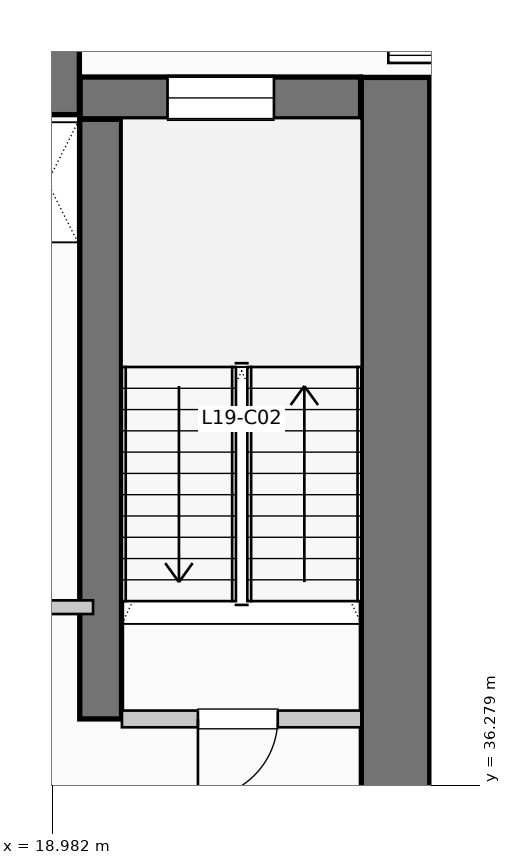
"""IFC4 building model, lengths in metres.
Left out: names, types, materials, properties, quantities, classifications, styles, units other than length and angle.
Written with IfcOpenShell. Run it as: python <this file> out.ifc"""

import sys

from ifc_helpers import new_model, si_unit, direction, frame, frame_2d, origin, place, context, subcontext, project, spatial, rectangle, extrude, element, fill, save


model = new_model("IFC4")
c1 = context("Model", 3, precision=1e-05, world=origin(), true_north=direction((0.0, 1.0)))
c2 = subcontext(c1, "Body", "Model", "MODEL_VIEW")
j1 = project(units=[si_unit("LENGTHUNIT", "METRE"), si_unit("PLANEANGLEUNIT", "RADIAN")], contexts=[c1])
p1 = place(None, origin())
s1 = spatial("IfcSite", under=j1, at=p1, CompositionType="ELEMENT")
p2 = place(p1, origin())
s2 = spatial("IfcBuilding", under=s1, at=p2, CompositionType="ELEMENT")
p3 = place(p2, frame((0.0, 0.0, 81.84)))
s3 = spatial("IfcBuildingStorey", under=s2, at=p3, CompositionType="ELEMENT", Elevation=81.84)
p4 = place(p3, frame((5.36, 45.55, 0.0), z_axis=(0.0, 0.0, 1.0), x_axis=(1.0, 0.0, 0.0)))
e1 = element("IfcWall", 1, at=p4, inside=s3, PredefinedType="SHEAR", context=c2, shape_type="SweptSolid", body=[
    extrude(rectangle(XDim=13.98, YDim=0.9, at=frame_2d((6.99, 0.0))), origin(), (0.0, 0.0, 1.0), 3.96),
])
p5 = place(p3, frame((23.5, 34.95, 0.0), z_axis=(0.0, 0.0, 1.0), x_axis=(0.0, 1.0, 0.0)))
e2 = element("IfcWall", 2, at=p5, inside=s3, PredefinedType="SHEAR", context=c2, shape_type="SweptSolid", body=[
    extrude(rectangle(XDim=10.64, YDim=0.9, at=frame_2d((5.32, 0.0))), origin(), (0.0, 0.0, 1.0), 3.96),
])
p6 = place(p3, frame((19.62, 37.15, 0.0), z_axis=(0.0, 0.0, 1.0), x_axis=(0.0, 1.0, 0.0)))
e3 = element("IfcWall", 3, at=p6, inside=s3, PredefinedType="SHEAR", context=c2, shape_type="SweptSolid", body=[
    extrude(rectangle(XDim=7.89, YDim=0.55, at=frame_2d((3.945, 0.0))), origin(), (0.0, 0.0, 1.0), 3.96),
])
p7 = place(p3, frame((19.35, 45.32, 0.0), z_axis=(0.0, 0.0, 1.0), x_axis=(1.0, 0.0, 0.0)))
e4 = element("IfcWall", 4, at=p7, inside=s3, PredefinedType="SHEAR", context=c2, shape_type="SweptSolid", body=[
    extrude(rectangle(XDim=3.69, YDim=0.55, at=frame_2d((1.845, 0.0))), origin(), (0.0, 0.0, 1.0), 3.96),
])
p8 = place(p7, frame((1.15, 0.0, 1.05)))
e5 = element("IfcOpeningElement", 5, at=p8, cuts=e4, PredefinedType="OPENING", context=c2, shape_type="SweptSolid", body=[
    extrude(rectangle(XDim=1.4, YDim=1.8, at=frame_2d((0.7, 0.9))), frame((0.0, 0.285, 0.0), z_axis=(0.0, -1.0, 0.0), x_axis=(1.0, 0.0, 0.0)), (0.0, 0.0, 1.0), 0.57),
])
p9 = place(p3, frame((19.9, 37.15, 0.0), z_axis=(0.0, 0.0, 1.0), x_axis=(1.0, 0.0, 0.0)))
e6 = element("IfcWall", 6, at=p9, inside=s3, PredefinedType="PARTITIONING", context=c2, shape_type="SweptSolid", body=[
    extrude(rectangle(XDim=3.15, YDim=0.22, at=frame_2d((1.575, 0.0))), origin(), (0.0, 0.0, 1.0), 3.71),
])
p10 = place(p9, frame((2.05, 0.0, 0.0), z_axis=(0.0, 0.0, 1.0), x_axis=(-1.0, 0.0, 0.0)))
e7 = element("IfcOpeningElement", 7, at=p10, cuts=e6, PredefinedType="OPENING", context=c2, shape_type="SweptSolid", body=[
    extrude(rectangle(XDim=1.05, YDim=2.15, at=frame_2d((0.525, 1.075))), frame((0.0, 0.12, 0.0), z_axis=(0.0, -1.0, 0.0), x_axis=(1.0, 0.0, 0.0)), (0.0, 0.0, 1.0), 0.24),
])
p11 = place(p3, frame((17.68, 38.62, 0.0), z_axis=(0.0, 0.0, 1.0), x_axis=(1.0, 0.0, 0.0)))
e8 = element("IfcWall", 8, at=p11, inside=s3, PredefinedType="PARTITIONING", context=c2, shape_type="SweptSolid", body=[
    extrude(rectangle(XDim=1.84, YDim=0.18, at=frame_2d((0.92, 0.0))), origin(), (0.0, 0.0, 1.0), 3.71),
])
p12 = place(p11, frame((0.24, 0.0, 0.0)))
e9 = element("IfcOpeningElement", 9, at=p12, cuts=e8, PredefinedType="OPENING", context=c2, shape_type="SweptSolid", body=[
    extrude(rectangle(XDim=0.92, YDim=2.1, at=frame_2d((0.46, 1.05))), frame((0.0, 0.1, 0.0), z_axis=(0.0, -1.0, 0.0), x_axis=(1.0, 0.0, 0.0)), (0.0, 0.0, 1.0), 0.2),
])
p13 = place(p8, origin())
e10 = element("IfcWindow", 10, at=p13, inside=s3, PartitioningType="SINGLE_PANEL", PredefinedType="WINDOW", context=c2, shape_type="SweptSolid", body=[
    extrude(rectangle(XDim=1.4, YDim=1.8, at=frame_2d((0.7, 0.9))), frame((0.0, 0.03, 0.0), z_axis=(0.0, -1.0, 0.0), x_axis=(1.0, 0.0, 0.0)), (0.0, 0.0, 1.0), 0.06),
])
fill(e5, e10)
p14 = place(p10, origin())
e11 = element("IfcDoor", 11, at=p14, inside=s3, OperationType="SINGLE_SWING_LEFT", PredefinedType="DOOR", context=c2, shape_type="SweptSolid", body=[
    extrude(rectangle(XDim=1.05, YDim=2.15, at=frame_2d((0.525, 1.075))), frame((0.0, 0.025, 0.0), z_axis=(0.0, -1.0, 0.0), x_axis=(1.0, 0.0, 0.0)), (0.0, 0.0, 1.0), 0.05),
])
fill(e7, e11)
save(model, sys.argv[1])
